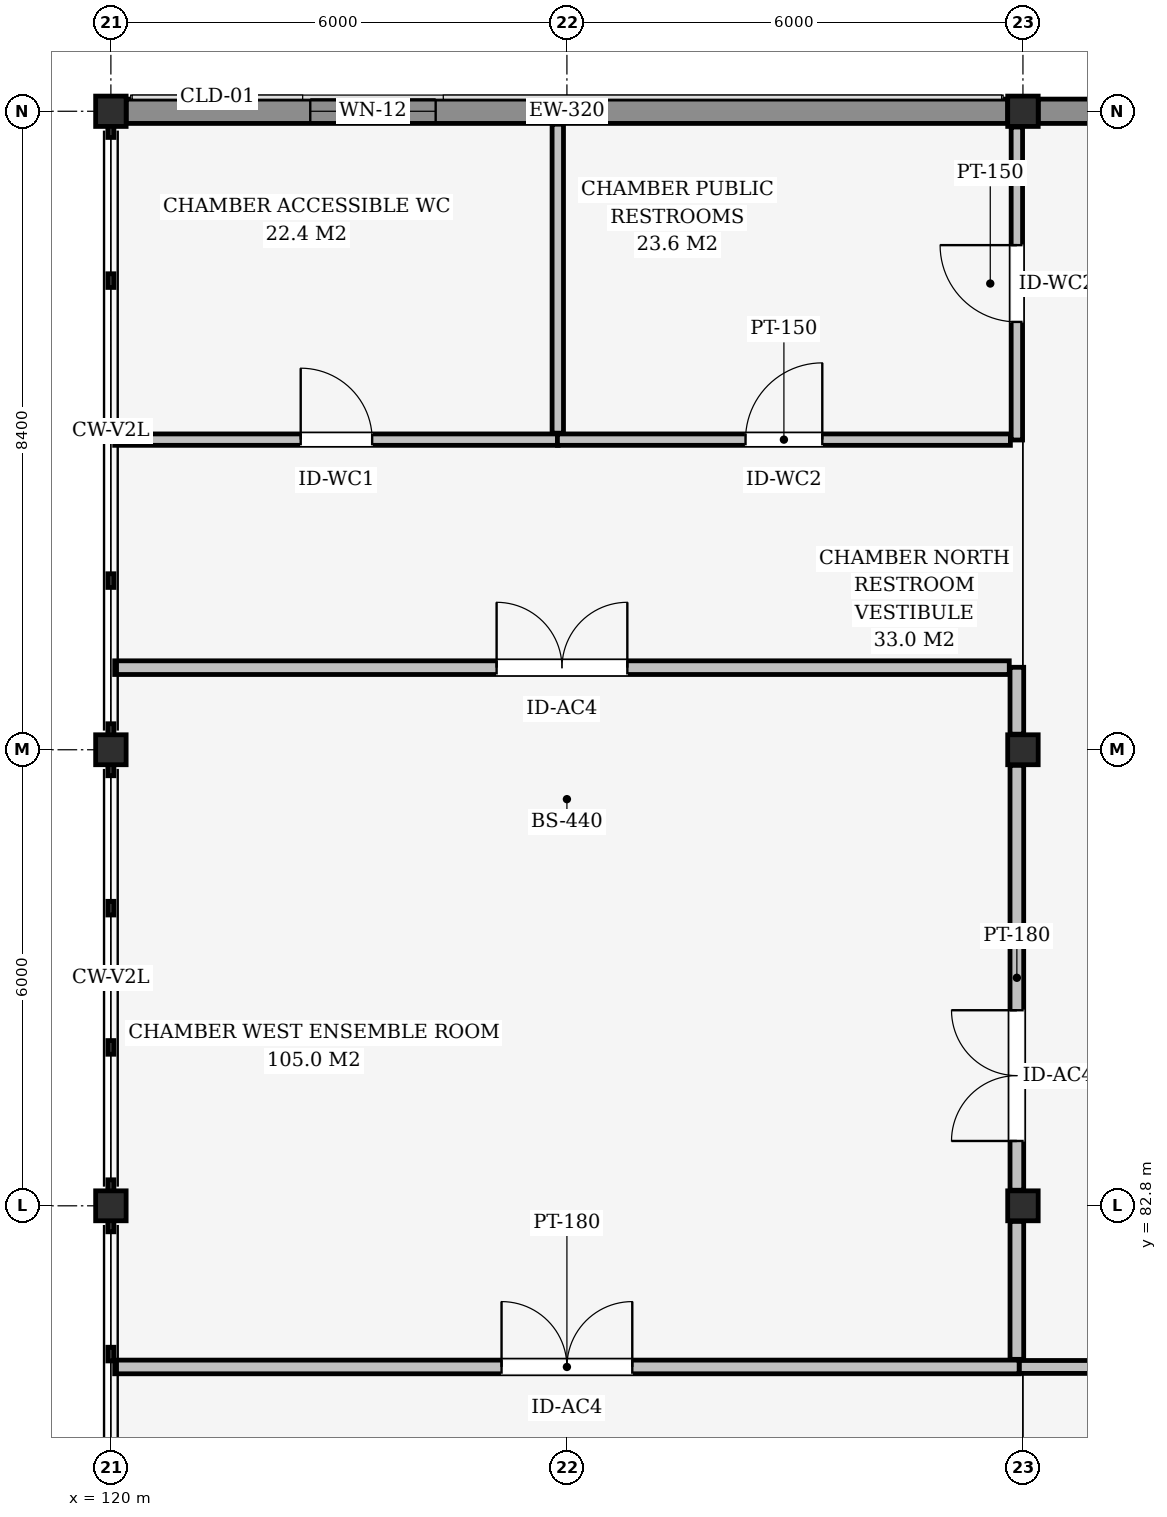
"""IFC4 building model, lengths in metres.
Left out: names, types, materials, properties, quantities, classifications, styles, units other than length and angle.
Written with IfcOpenShell. Run it as: python <this file> out.ifc"""

import sys

from ifc_helpers import new_model, si_unit, direction, frame, frame_2d, origin, origin_2d, place, context, subcontext, project, spatial, rectangle, i_section, extrude, element, fill, save


model = new_model("IFC4")
c1 = context("Model", 3, precision=1e-05, world=origin(), true_north=direction((0.0, 1.0)))
c2 = subcontext(c1, "Body", "Model", "MODEL_VIEW")
j1 = project(units=[si_unit("LENGTHUNIT", "METRE"), si_unit("PLANEANGLEUNIT", "RADIAN")], contexts=[c1])
p1 = place(None, origin())
s1 = spatial("IfcSite", under=j1, at=p1, CompositionType="ELEMENT")
p2 = place(p1, origin())
s2 = spatial("IfcBuilding", under=s1, at=p2, CompositionType="ELEMENT")
p3 = place(p2, origin())
s3 = spatial("IfcBuildingStorey", under=s2, at=p3, CompositionType="ELEMENT", Elevation=0.0)
for number, where, z_axis, x_axis in (
    (1, (120.0, 82.8, 0.0), (0.0, 0.0, 1.0), (1.0, 0.0, 0.0)),
    (2, (120.0, 88.8, 0.0), (0.0, 0.0, 1.0), (1.0, 0.0, 0.0)),
):
    element("IfcColumn", number, at=place(p3, frame(where, z_axis=z_axis, x_axis=x_axis)), inside=s3, PredefinedType="COLUMN", context=c2, shape_type="SweptSolid", body=[
        extrude(i_section(OverallWidth=0.401, OverallDepth=0.394, WebThickness=0.023, FlangeThickness=0.037, at=origin_2d()), origin(), (0.0, 0.0, 1.0), 4.8),
    ])
p4 = place(p3, frame((120.0, 97.2, 0.0), z_axis=(0.0, 0.0, 1.0), x_axis=(1.0, 0.0, 0.0)))
e3 = element("IfcColumn", 3, at=p4, inside=s3, PredefinedType="COLUMN", context=c2, shape_type="SweptSolid", body=[
    extrude(i_section(OverallWidth=0.401, OverallDepth=0.399, WebThickness=0.025, FlangeThickness=0.04, at=origin_2d()), origin(), (0.0, 0.0, 1.0), 4.8),
])
for number, where, z_axis, x_axis in (
    (4, (132.0, 82.8, 0.0), (0.0, 0.0, 1.0), (1.0, 0.0, 0.0)),
    (5, (132.0, 88.8, 0.0), (0.0, 0.0, 1.0), (1.0, 0.0, 0.0)),
):
    element("IfcColumn", number, at=place(p3, frame(where, z_axis=z_axis, x_axis=x_axis)), inside=s3, PredefinedType="COLUMN", context=c2, shape_type="SweptSolid", body=[
        extrude(i_section(OverallWidth=0.401, OverallDepth=0.394, WebThickness=0.023, FlangeThickness=0.037, at=origin_2d()), origin(), (0.0, 0.0, 1.0), 4.8),
    ])
p5 = place(p3, frame((132.0, 97.2, 0.0), z_axis=(0.0, 0.0, 1.0), x_axis=(1.0, 0.0, 0.0)))
e6 = element("IfcColumn", 6, at=p5, inside=s3, PredefinedType="COLUMN", context=c2, shape_type="SweptSolid", body=[
    extrude(i_section(OverallWidth=0.401, OverallDepth=0.399, WebThickness=0.025, FlangeThickness=0.04, at=origin_2d()), origin(), (0.0, 0.0, 1.0), 4.8),
])
p6 = place(p3, frame((120.2, 97.2, 0.0), z_axis=(0.0, 0.0, 1.0), x_axis=(1.0, 0.0, 0.0)))
e7 = element("IfcWall", 7, at=p6, inside=s3, PredefinedType="SOLIDWALL", context=c2, shape_type="SweptSolid", body=[
    extrude(rectangle(XDim=11.599, YDim=0.32, at=frame_2d((5.8, 0.0))), origin(), (0.0, 0.0, 1.0), 3.67),
])
p7 = place(p6, frame((2.423, 0.0, 0.85)))
e8 = element("IfcOpeningElement", 8, at=p7, cuts=e7, PredefinedType="OPENING", context=c2, shape_type="SweptSolid", body=[
    extrude(rectangle(XDim=1.65, YDim=1.75, at=frame_2d((0.825, 0.875))), frame((0.0, 0.17, 0.0), z_axis=(0.0, -1.0, 0.0), x_axis=(1.0, 0.0, 0.0)), (0.0, 0.0, 1.0), 0.34),
])
p8 = place(p3, frame((132.2, 97.2, 0.0), z_axis=(0.0, 0.0, 1.0), x_axis=(1.0, 0.0, 0.0)))
e9 = element("IfcWall", 9, at=p8, inside=s3, PredefinedType="SOLIDWALL", context=c2, shape_type="SweptSolid", body=[
    extrude(rectangle(XDim=11.375, YDim=0.32, at=frame_2d((5.687, 0.0))), origin(), (0.0, 0.0, 1.0), 3.67),
])
p9 = place(p8, frame((4.737, 0.0, 0.0)))
e10 = element("IfcOpeningElement", 10, at=p9, cuts=e9, PredefinedType="OPENING", context=c2, shape_type="SweptSolid", body=[
    extrude(rectangle(XDim=1.9, YDim=2.35, at=frame_2d((0.95, 1.175))), frame((0.0, 0.17, 0.0), z_axis=(0.0, -1.0, 0.0), x_axis=(1.0, 0.0, 0.0)), (0.0, 0.0, 1.0), 0.34),
])
p10 = place(p3, frame((131.95, 80.68, 0.0), z_axis=(0.0, 0.0, 1.0), x_axis=(1.0, 0.0, 0.0)))
e11 = element("IfcWall", 11, at=p10, inside=s3, PredefinedType="PARTITIONING", context=c2, shape_type="SweptSolid", body=[
    extrude(rectangle(XDim=12.705, YDim=0.17, at=frame_2d((6.353, 0.0))), origin(), (0.0, 0.0, 1.0), 4.52),
])
p11 = place(p3, frame((120.05, 80.68, 0.0), z_axis=(0.0, 0.0, 1.0), x_axis=(1.0, 0.0, 0.0)))
e12 = element("IfcWall", 12, at=p11, inside=s3, PredefinedType="PARTITIONING", context=c2, shape_type="SweptSolid", body=[
    extrude(rectangle(XDim=11.9, YDim=0.18, at=frame_2d((5.95, 0.0))), origin(), (0.0, 0.0, 1.0), 4.52),
])
p12 = place(p11, frame((5.09, 0.0, 0.0)))
e13 = element("IfcOpeningElement", 13, at=p12, cuts=e12, PredefinedType="OPENING", context=c2, shape_type="SweptSolid", body=[
    extrude(rectangle(XDim=1.72, YDim=2.34, at=frame_2d((0.86, 1.17))), frame((0.0, 0.1, 0.0), z_axis=(0.0, -1.0, 0.0), x_axis=(1.0, 0.0, 0.0)), (0.0, 0.0, 1.0), 0.2),
])
p13 = place(p3, frame((131.92, 80.78, 0.0), z_axis=(0.0, 0.0, 1.0), x_axis=(0.0, 1.0, 0.0)))
e14 = element("IfcWall", 14, at=p13, inside=s3, PredefinedType="PARTITIONING", context=c2, shape_type="SweptSolid", body=[
    extrude(rectangle(XDim=1.815, YDim=0.18, at=frame_2d((0.907, 0.0))), origin(), (0.0, 0.0, 1.0), 3.909),
])
p14 = place(p3, frame((131.92, 83.005, 0.0), z_axis=(0.0, 0.0, 1.0), x_axis=(0.0, 1.0, 0.0)))
e15 = element("IfcWall", 15, at=p14, inside=s3, PredefinedType="PARTITIONING", context=c2, shape_type="SweptSolid", body=[
    extrude(rectangle(XDim=5.59, YDim=0.18, at=frame_2d((2.795, 0.0))), origin(), (0.0, 0.0, 1.0), 3.908),
])
p15 = place(p14, frame((0.648, 0.0, 0.0)))
e16 = element("IfcOpeningElement", 16, at=p15, cuts=e15, PredefinedType="OPENING", context=c2, shape_type="SweptSolid", body=[
    extrude(rectangle(XDim=1.72, YDim=2.34, at=frame_2d((0.86, 1.17))), frame((0.0, 0.1, 0.0), z_axis=(0.0, -1.0, 0.0), x_axis=(1.0, 0.0, 0.0)), (0.0, 0.0, 1.0), 0.2),
])
p16 = place(p3, frame((131.92, 89.005, 0.0), z_axis=(0.0, 0.0, 1.0), x_axis=(0.0, 1.0, 0.0)))
e17 = element("IfcWall", 17, at=p16, inside=s3, PredefinedType="PARTITIONING", context=c2, shape_type="SweptSolid", body=[
    extrude(rectangle(XDim=0.88, YDim=0.18, at=frame_2d((0.44, 0.0))), origin(), (0.0, 0.0, 1.0), 3.908),
])
p17 = place(p3, frame((131.92, 92.875, 0.0), z_axis=(0.0, 0.0, 1.0), x_axis=(0.0, 1.0, 0.0)))
e18 = element("IfcWall", 18, at=p17, inside=s3, PredefinedType="PARTITIONING", context=c2, shape_type="SweptSolid", body=[
    extrude(rectangle(XDim=4.117, YDim=0.15, at=frame_2d((2.059, 0.0))), origin(), (0.0, 0.0, 1.0), 3.908),
])
p18 = place(p17, frame((1.554, 0.0, 0.0)))
e19 = element("IfcOpeningElement", 19, at=p18, cuts=e18, PredefinedType="OPENING", context=c2, shape_type="SweptSolid", body=[
    extrude(rectangle(XDim=1.01, YDim=2.1, at=frame_2d((0.505, 1.05))), frame((0.0, 0.085, 0.0), z_axis=(0.0, -1.0, 0.0), x_axis=(1.0, 0.0, 0.0)), (0.0, 0.0, 1.0), 0.17),
])
p19 = place(p3, frame((120.05, 89.88, 0.0), z_axis=(0.0, 0.0, 1.0), x_axis=(1.0, 0.0, 0.0)))
e20 = element("IfcWall", 20, at=p19, inside=s3, PredefinedType="PARTITIONING", context=c2, shape_type="SweptSolid", body=[
    extrude(rectangle(XDim=11.77, YDim=0.18, at=frame_2d((5.885, 0.0))), origin(), (0.0, 0.0, 1.0), 4.52),
])
p20 = place(p19, frame((5.025, 0.0, 0.0)))
e21 = element("IfcOpeningElement", 21, at=p20, cuts=e20, PredefinedType="OPENING", context=c2, shape_type="SweptSolid", body=[
    extrude(rectangle(XDim=1.72, YDim=2.34, at=frame_2d((0.86, 1.17))), frame((0.0, 0.1, 0.0), z_axis=(0.0, -1.0, 0.0), x_axis=(1.0, 0.0, 0.0)), (0.0, 0.0, 1.0), 0.2),
])
p21 = place(p3, frame((120.05, 92.88, 0.0), z_axis=(0.0, 0.0, 1.0), x_axis=(1.0, 0.0, 0.0)))
e22 = element("IfcWall", 22, at=p21, inside=s3, PredefinedType="PARTITIONING", context=c2, shape_type="SweptSolid", body=[
    extrude(rectangle(XDim=5.835, YDim=0.15, at=frame_2d((2.917, 0.0))), origin(), (0.0, 0.0, 1.0), 4.52),
])
p22 = place(p21, frame((2.448, 0.0, 0.0)))
e23 = element("IfcOpeningElement", 23, at=p22, cuts=e22, PredefinedType="OPENING", context=c2, shape_type="SweptSolid", body=[
    extrude(rectangle(XDim=0.94, YDim=2.1, at=frame_2d((0.47, 1.05))), frame((0.0, 0.085, 0.0), z_axis=(0.0, -1.0, 0.0), x_axis=(1.0, 0.0, 0.0)), (0.0, 0.0, 1.0), 0.17),
])
p23 = place(p3, frame((125.875, 92.88, 0.0), z_axis=(0.0, 0.0, 1.0), x_axis=(1.0, 0.0, 0.0)))
e24 = element("IfcWall", 24, at=p23, inside=s3, PredefinedType="PARTITIONING", context=c2, shape_type="SweptSolid", body=[
    extrude(rectangle(XDim=5.96, YDim=0.15, at=frame_2d((2.98, 0.0))), origin(), (0.0, 0.0, 1.0), 4.52),
])
p24 = place(p23, frame((2.475, 0.0, 0.0)))
e25 = element("IfcOpeningElement", 25, at=p24, cuts=e24, PredefinedType="OPENING", context=c2, shape_type="SweptSolid", body=[
    extrude(rectangle(XDim=1.01, YDim=2.1, at=frame_2d((0.505, 1.05))), frame((0.0, 0.085, 0.0), z_axis=(0.0, -1.0, 0.0), x_axis=(1.0, 0.0, 0.0)), (0.0, 0.0, 1.0), 0.17),
])
p25 = place(p3, frame((125.88, 92.965, 0.0), z_axis=(0.0, 0.0, 1.0), x_axis=(0.0, 1.0, 0.0)))
e26 = element("IfcWall", 26, at=p25, inside=s3, PredefinedType="PARTITIONING", context=c2, shape_type="SweptSolid", body=[
    extrude(rectangle(XDim=4.065, YDim=0.15, at=frame_2d((2.032, 0.0))), origin(), (0.0, 0.0, 1.0), 4.063),
])
p26 = place(p7, origin())
e27 = element("IfcWindow", 27, at=p26, inside=s3, PartitioningType="SINGLE_PANEL", PredefinedType="WINDOW", context=c2, shape_type="SweptSolid", body=[
    extrude(rectangle(XDim=1.65, YDim=1.75, at=frame_2d((0.825, 0.875))), frame((0.0, 0.03, 0.0), z_axis=(0.0, -1.0, 0.0), x_axis=(1.0, 0.0, 0.0)), (0.0, 0.0, 1.0), 0.06),
])
fill(e8, e27)
p27 = place(p12, origin())
e28 = element("IfcDoor", 28, at=p27, inside=s3, OperationType="DOUBLE_DOOR_SINGLE_SWING", PredefinedType="DOOR", context=c2, shape_type="SweptSolid", body=[
    extrude(rectangle(XDim=1.72, YDim=2.34, at=frame_2d((0.86, 1.17))), frame((0.0, 0.025, 0.0), z_axis=(0.0, -1.0, 0.0), x_axis=(1.0, 0.0, 0.0)), (0.0, 0.0, 1.0), 0.05),
])
fill(e13, e28)
p28 = place(p15, origin())
e29 = element("IfcDoor", 29, at=p28, inside=s3, OperationType="DOUBLE_DOOR_SINGLE_SWING", PredefinedType="DOOR", context=c2, shape_type="SweptSolid", body=[
    extrude(rectangle(XDim=1.72, YDim=2.34, at=frame_2d((0.86, 1.17))), frame((0.0, 0.025, 0.0), z_axis=(0.0, -1.0, 0.0), x_axis=(1.0, 0.0, 0.0)), (0.0, 0.0, 1.0), 0.05),
])
fill(e16, e29)
p29 = place(p18, origin())
e30 = element("IfcDoor", 30, at=p29, inside=s3, OperationType="SINGLE_SWING_RIGHT", PredefinedType="DOOR", context=c2, shape_type="SweptSolid", body=[
    extrude(rectangle(XDim=1.01, YDim=2.1, at=frame_2d((0.505, 1.05))), frame((0.0, 0.025, 0.0), z_axis=(0.0, -1.0, 0.0), x_axis=(1.0, 0.0, 0.0)), (0.0, 0.0, 1.0), 0.05),
])
fill(e19, e30)
p30 = place(p20, origin())
e31 = element("IfcDoor", 31, at=p30, inside=s3, OperationType="DOUBLE_DOOR_SINGLE_SWING", PredefinedType="DOOR", context=c2, shape_type="SweptSolid", body=[
    extrude(rectangle(XDim=1.72, YDim=2.34, at=frame_2d((0.86, 1.17))), frame((0.0, 0.025, 0.0), z_axis=(0.0, -1.0, 0.0), x_axis=(1.0, 0.0, 0.0)), (0.0, 0.0, 1.0), 0.05),
])
fill(e21, e31)
p31 = place(p22, origin())
e32 = element("IfcDoor", 32, at=p31, inside=s3, OperationType="SINGLE_SWING_LEFT", PredefinedType="DOOR", context=c2, shape_type="SweptSolid", body=[
    extrude(rectangle(XDim=0.94, YDim=2.1, at=frame_2d((0.47, 1.05))), frame((0.0, 0.025, 0.0), z_axis=(0.0, -1.0, 0.0), x_axis=(1.0, 0.0, 0.0)), (0.0, 0.0, 1.0), 0.05),
])
fill(e23, e32)
p32 = place(p24, origin())
e33 = element("IfcDoor", 33, at=p32, inside=s3, OperationType="SINGLE_SWING_RIGHT", PredefinedType="DOOR", context=c2, shape_type="SweptSolid", body=[
    extrude(rectangle(XDim=1.01, YDim=2.1, at=frame_2d((0.505, 1.05))), frame((0.0, 0.025, 0.0), z_axis=(0.0, -1.0, 0.0), x_axis=(1.0, 0.0, 0.0)), (0.0, 0.0, 1.0), 0.05),
])
fill(e25, e33)
save(model, sys.argv[1])
